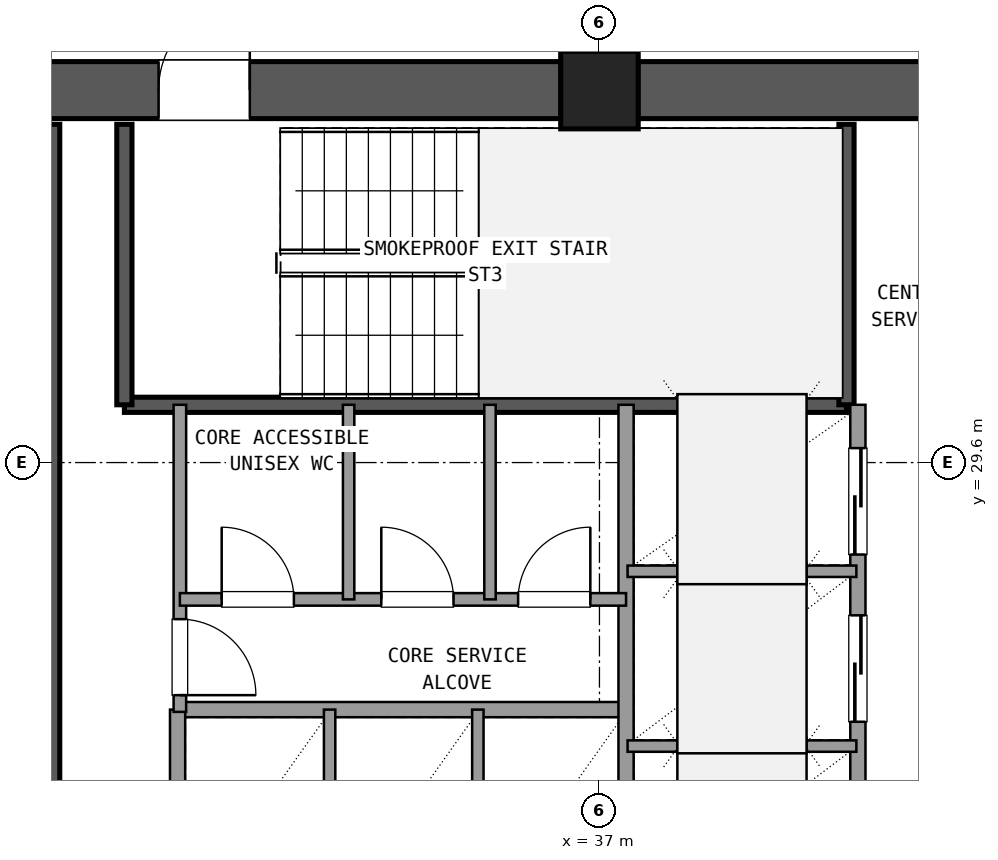
"""IFC4 building model, lengths in metres.
Left out: names, types, materials, properties, quantities, classifications, styles, units other than length and angle.
Written with IfcOpenShell. Run it as: python <this file> out.ifc"""

import sys

from ifc_helpers import new_model, si_unit, direction, frame, frame_2d, origin, origin_2d, place, context, subcontext, project, spatial, rectangle, extrude, element, fill, save


model = new_model("IFC4")
c1 = context("Model", 3, precision=1e-05, world=origin(), true_north=direction((0.0, 1.0)))
c2 = subcontext(c1, "Body", "Model", "MODEL_VIEW")
j1 = project(units=[si_unit("LENGTHUNIT", "METRE"), si_unit("PLANEANGLEUNIT", "RADIAN")], contexts=[c1])
p1 = place(None, origin())
s1 = spatial("IfcSite", under=j1, at=p1, CompositionType="ELEMENT")
p2 = place(p1, origin())
s2 = spatial("IfcBuilding", under=s1, at=p2, CompositionType="ELEMENT")
p3 = place(p2, frame((0.0, 0.0, 117.18)))
s3 = spatial("IfcBuildingStorey", under=s2, at=p3, CompositionType="ELEMENT", Elevation=117.18)
p4 = place(p3, frame((37.0, 34.5, 0.0), z_axis=(0.0, 0.0, 1.0), x_axis=(1.0, 0.0, 0.0)))
e1 = element("IfcColumn", 1, at=p4, inside=s3, PredefinedType="COLUMN", context=c2, shape_type="SweptSolid", body=[
    extrude(rectangle(XDim=1.02, YDim=1.02, at=origin_2d()), origin(), (0.0, 0.0, 1.0), 3.6),
])
p5 = place(p3, frame((47.695, 34.5, 0.0), z_axis=(0.0, 0.0, 1.0), x_axis=(-1.0, 0.0, 0.0)))
e2 = element("IfcWall", 2, at=p5, inside=s3, PredefinedType="SHEAR", context=c2, shape_type="SweptSolid", body=[
    extrude(rectangle(XDim=10.19, YDim=0.75, at=frame_2d((5.095, 0.0))), origin(), (0.0, 0.0, 1.0), 3.32),
])
p6 = place(p5, frame((4.595, 0.0, 0.0)))
e3 = element("IfcOpeningElement", 3, at=p6, cuts=e2, PredefinedType="OPENING", context=c2, shape_type="SweptSolid", body=[
    extrude(rectangle(XDim=1.6, YDim=2.2, at=frame_2d((0.8, 1.1))), frame((0.0, 0.385, 0.0), z_axis=(0.0, -1.0, 0.0), x_axis=(1.0, 0.0, 0.0)), (0.0, 0.0, 1.0), 0.77),
])
p7 = place(p3, frame((36.495, 34.5, 0.0), z_axis=(0.0, 0.0, 1.0), x_axis=(-1.0, 0.0, 0.0)))
e4 = element("IfcWall", 4, at=p7, inside=s3, PredefinedType="SHEAR", context=c2, shape_type="SweptSolid", body=[
    extrude(rectangle(XDim=10.19, YDim=0.75, at=frame_2d((5.095, 0.0))), origin(), (0.0, 0.0, 1.0), 3.32),
])
p8 = place(p7, frame((4.095, 0.0, 0.0)))
e5 = element("IfcOpeningElement", 5, at=p8, cuts=e4, PredefinedType="OPENING", context=c2, shape_type="SweptSolid", body=[
    extrude(rectangle(XDim=1.2, YDim=2.15, at=frame_2d((0.6, 1.075))), frame((0.0, 0.385, 0.0), z_axis=(0.0, -1.0, 0.0), x_axis=(1.0, 0.0, 0.0)), (0.0, 0.0, 1.0), 0.77),
])
p9 = place(p3, frame((29.8, 24.65, 0.0), z_axis=(0.0, 0.0, 1.0), x_axis=(0.0, 1.0, 0.0)))
e6 = element("IfcWall", 6, at=p9, inside=s3, PredefinedType="SHEAR", context=c2, shape_type="SweptSolid", body=[
    extrude(rectangle(XDim=9.4, YDim=0.2, at=frame_2d((4.7, 0.0))), origin(), (0.0, 0.0, 1.0), 3.32),
])
p10 = place(p3, frame((30.75, 30.36, 0.0), z_axis=(0.0, 0.0, 1.0), x_axis=(1.0, 0.0, 0.0)))
e7 = element("IfcWall", 7, at=p10, inside=s3, PredefinedType="SHEAR", context=c2, shape_type="SweptSolid", body=[
    extrude(rectangle(XDim=9.5, YDim=0.2, at=frame_2d((4.75, 0.0))), origin(), (0.0, 0.0, 1.0), 3.32),
])
for number, where, z_axis, x_axis in (
    (8, (30.75, 30.36, 0.0), (0.0, 0.0, 1.0), (0.0, 1.0, 0.0)),
    (9, (40.25, 30.36, 0.0), (0.0, 0.0, 1.0), (0.0, 1.0, 0.0)),
):
    element("IfcWall", number, at=place(p3, frame(where, z_axis=z_axis, x_axis=x_axis)), inside=s3, PredefinedType="SHEAR", context=c2, shape_type="SweptSolid", body=[
        extrude(rectangle(XDim=3.69, YDim=0.2, at=frame_2d((1.845, 0.0))), origin(), (0.0, 0.0, 1.0), 3.32),
    ])
p11 = place(p3, frame((31.45, 26.35, 0.0), z_axis=(0.0, 0.0, 1.0), x_axis=(1.0, 0.0, 0.0)))
e10 = element("IfcWall", 10, at=p11, inside=s3, PredefinedType="SOLIDWALL", context=c2, shape_type="SweptSolid", body=[
    extrude(rectangle(XDim=5.9, YDim=0.2, at=frame_2d((2.95, 0.0))), origin(), (0.0, 0.0, 1.0), 2.61),
])
p12 = place(p3, frame((31.45, 23.54, 0.0), z_axis=(0.0, 0.0, 1.0), x_axis=(0.0, 1.0, 0.0)))
e11 = element("IfcWall", 11, at=p12, inside=s3, PredefinedType="SOLIDWALL", context=c2, shape_type="SweptSolid", body=[
    extrude(rectangle(XDim=2.81, YDim=0.2, at=frame_2d((1.405, 0.0))), origin(), (0.0, 0.0, 1.0), 2.61),
])
for number, where, z_axis, x_axis in (
    (12, (33.45, 23.54, 0.0), (0.0, 0.0, 1.0), (0.0, 1.0, 0.0)),
    (13, (35.4, 23.54, 0.0), (0.0, 0.0, 1.0), (0.0, 1.0, 0.0)),
):
    element("IfcWall", number, at=place(p3, frame(where, z_axis=z_axis, x_axis=x_axis)), inside=s3, PredefinedType="PARTITIONING", context=c2, shape_type="SweptSolid", body=[
        extrude(rectangle(XDim=2.81, YDim=0.15, at=frame_2d((1.405, 0.0))), origin(), (0.0, 0.0, 1.0), 2.61),
    ])
p13 = place(p3, frame((37.35, 23.54, 0.0), z_axis=(0.0, 0.0, 1.0), x_axis=(0.0, 1.0, 0.0)))
e14 = element("IfcWall", 14, at=p13, inside=s3, PredefinedType="SOLIDWALL", context=c2, shape_type="SweptSolid", body=[
    extrude(rectangle(XDim=6.82, YDim=0.2, at=frame_2d((3.41, 0.0))), origin(), (0.0, 0.0, 1.0), 2.61),
])
p14 = place(p3, frame((40.4, 23.54, 0.0), z_axis=(0.0, 0.0, 1.0), x_axis=(0.0, 1.0, 0.0)))
e15 = element("IfcWall", 15, at=p14, inside=s3, PredefinedType="SOLIDWALL", context=c2, shape_type="SweptSolid", body=[
    extrude(rectangle(XDim=6.82, YDim=0.2, at=frame_2d((3.41, 0.0))), origin(), (0.0, 0.0, 1.0), 2.61),
])
p15 = place(p14, frame((0.35, 0.0, 0.0)))
e16 = element("IfcOpeningElement", 16, at=p15, cuts=e15, PredefinedType="OPENING", context=c2, shape_type="SweptSolid", body=[
    extrude(rectangle(XDim=1.4, YDim=2.2, at=frame_2d((0.7, 1.1))), frame((0.0, 0.11, 0.0), z_axis=(0.0, -1.0, 0.0), x_axis=(1.0, 0.0, 0.0)), (0.0, 0.0, 1.0), 0.22),
])
p16 = place(p14, frame((2.65, 0.0, 0.0)))
e17 = element("IfcOpeningElement", 17, at=p16, cuts=e15, PredefinedType="OPENING", context=c2, shape_type="SweptSolid", body=[
    extrude(rectangle(XDim=1.4, YDim=2.2, at=frame_2d((0.7, 1.1))), frame((0.0, 0.11, 0.0), z_axis=(0.0, -1.0, 0.0), x_axis=(1.0, 0.0, 0.0)), (0.0, 0.0, 1.0), 0.22),
])
p17 = place(p14, frame((4.85, 0.0, 0.0)))
e18 = element("IfcOpeningElement", 18, at=p17, cuts=e15, PredefinedType="OPENING", context=c2, shape_type="SweptSolid", body=[
    extrude(rectangle(XDim=1.4, YDim=2.2, at=frame_2d((0.7, 1.1))), frame((0.0, 0.11, 0.0), z_axis=(0.0, -1.0, 0.0), x_axis=(1.0, 0.0, 0.0)), (0.0, 0.0, 1.0), 0.22),
])
for number, where, z_axis, x_axis in (
    (19, (37.37, 25.87, 0.0), (0.0, 0.0, 1.0), (1.0, 0.0, 0.0)),
    (20, (37.37, 28.17, 0.0), (0.0, 0.0, 1.0), (1.0, 0.0, 0.0)),
):
    element("IfcWall", number, at=place(p3, frame(where, z_axis=z_axis, x_axis=x_axis)), inside=s3, PredefinedType="PARTITIONING", context=c2, shape_type="SweptSolid", body=[
        extrude(rectangle(XDim=3.01, YDim=0.15, at=frame_2d((1.505, 0.0))), origin(), (0.0, 0.0, 1.0), 2.61),
    ])
p18 = place(p3, frame((31.48, 26.32, 0.0), z_axis=(0.0, 0.0, 1.0), x_axis=(0.0, 1.0, 0.0)))
e21 = element("IfcWall", 21, at=p18, inside=s3, PredefinedType="PLUMBINGWALL", context=c2, shape_type="SweptSolid", body=[
    extrude(rectangle(XDim=4.04, YDim=0.165, at=frame_2d((2.02, 0.0))), origin(), (0.0, 0.0, 1.0), 2.61),
])
p19 = place(p18, frame((0.22, 0.0, 0.0)))
e22 = element("IfcOpeningElement", 22, at=p19, cuts=e21, PredefinedType="OPENING", context=c2, shape_type="SweptSolid", body=[
    extrude(rectangle(XDim=1.0, YDim=2.15, at=frame_2d((0.5, 1.075))), frame((0.0, 0.093, 0.0), z_axis=(0.0, -1.0, 0.0), x_axis=(1.0, 0.0, 0.0)), (0.0, 0.0, 1.0), 0.185),
])
p20 = place(p3, frame((31.48, 27.8, 0.0), z_axis=(0.0, 0.0, 1.0), x_axis=(1.0, 0.0, 0.0)))
e23 = element("IfcWall", 23, at=p20, inside=s3, PredefinedType="PLUMBINGWALL", context=c2, shape_type="SweptSolid", body=[
    extrude(rectangle(XDim=5.87, YDim=0.165, at=frame_2d((2.935, 0.0))), origin(), (0.0, 0.0, 1.0), 2.61),
])
p21 = place(p20, frame((0.55, 0.0, 0.0)))
e24 = element("IfcOpeningElement", 24, at=p21, cuts=e23, PredefinedType="OPENING", context=c2, shape_type="SweptSolid", body=[
    extrude(rectangle(XDim=0.95, YDim=2.1, at=frame_2d((0.475, 1.05))), frame((0.0, 0.093, 0.0), z_axis=(0.0, -1.0, 0.0), x_axis=(1.0, 0.0, 0.0)), (0.0, 0.0, 1.0), 0.185),
])
p22 = place(p20, frame((2.65, 0.0, 0.0)))
e25 = element("IfcOpeningElement", 25, at=p22, cuts=e23, PredefinedType="OPENING", context=c2, shape_type="SweptSolid", body=[
    extrude(rectangle(XDim=0.95, YDim=2.1, at=frame_2d((0.475, 1.05))), frame((0.0, 0.093, 0.0), z_axis=(0.0, -1.0, 0.0), x_axis=(1.0, 0.0, 0.0)), (0.0, 0.0, 1.0), 0.185),
])
p23 = place(p20, frame((4.45, 0.0, 0.0)))
e26 = element("IfcOpeningElement", 26, at=p23, cuts=e23, PredefinedType="OPENING", context=c2, shape_type="SweptSolid", body=[
    extrude(rectangle(XDim=0.95, YDim=2.1, at=frame_2d((0.475, 1.05))), frame((0.0, 0.093, 0.0), z_axis=(0.0, -1.0, 0.0), x_axis=(1.0, 0.0, 0.0)), (0.0, 0.0, 1.0), 0.185),
])
for number, where, z_axis, x_axis in (
    (27, (33.7, 27.8, 0.0), (0.0, 0.0, 1.0), (0.0, 1.0, 0.0)),
    (28, (35.56, 27.8, 0.0), (0.0, 0.0, 1.0), (0.0, 1.0, 0.0)),
):
    element("IfcWall", number, at=place(p3, frame(where, z_axis=z_axis, x_axis=x_axis)), inside=s3, PredefinedType="PARTITIONING", context=c2, shape_type="SweptSolid", body=[
        extrude(rectangle(XDim=2.56, YDim=0.15, at=frame_2d((1.28, 0.0))), origin(), (0.0, 0.0, 1.0), 2.61),
    ])
p24 = place(p3, frame((37.0, 34.95, 0.0), z_axis=(0.0, 0.0, 1.0), x_axis=(0.0, 1.0, 0.0)))
e29 = element("IfcWall", 29, at=p24, inside=s3, PredefinedType="PARTITIONING", context=c2, shape_type="SweptSolid", body=[
    extrude(rectangle(XDim=3.21, YDim=0.18, at=frame_2d((1.605, 0.0))), origin(), (0.0, 0.0, 1.0), 2.61),
])
p25 = place(p24, frame((0.605, 0.0, 0.0)))
e30 = element("IfcOpeningElement", 30, at=p25, cuts=e29, PredefinedType="OPENING", context=c2, shape_type="SweptSolid", body=[
    extrude(rectangle(XDim=2.0, YDim=2.2, at=frame_2d((1.0, 1.1))), frame((0.0, 0.1, 0.0), z_axis=(0.0, -1.0, 0.0), x_axis=(1.0, 0.0, 0.0)), (0.0, 0.0, 1.0), 0.2),
])
p26 = place(p8, frame((1.2, 0.0, 0.0), z_axis=(0.0, 0.0, 1.0), x_axis=(-1.0, 0.0, 0.0)))
e31 = element("IfcDoor", 31, at=p26, inside=s3, OperationType="SINGLE_SWING_LEFT", PredefinedType="DOOR", context=c2, shape_type="SweptSolid", body=[
    extrude(rectangle(XDim=1.2, YDim=2.15, at=frame_2d((0.6, 1.075))), frame((0.0, 0.025, 0.0), z_axis=(0.0, -1.0, 0.0), x_axis=(1.0, 0.0, 0.0)), (0.0, 0.0, 1.0), 0.05),
])
fill(e5, e31)
p27 = place(p16, origin())
e32 = element("IfcDoor", 32, at=p27, inside=s3, OperationType="SLIDING_TO_LEFT", PredefinedType="DOOR", context=c2, shape_type="SweptSolid", body=[
    extrude(rectangle(XDim=1.4, YDim=2.2, at=frame_2d((0.7, 1.1))), frame((0.0, 0.025, 0.0), z_axis=(0.0, -1.0, 0.0), x_axis=(1.0, 0.0, 0.0)), (0.0, 0.0, 1.0), 0.05),
])
fill(e17, e32)
p28 = place(p17, origin())
e33 = element("IfcDoor", 33, at=p28, inside=s3, OperationType="SLIDING_TO_RIGHT", PredefinedType="DOOR", context=c2, shape_type="SweptSolid", body=[
    extrude(rectangle(XDim=1.4, YDim=2.2, at=frame_2d((0.7, 1.1))), frame((0.0, 0.025, 0.0), z_axis=(0.0, -1.0, 0.0), x_axis=(1.0, 0.0, 0.0)), (0.0, 0.0, 1.0), 0.05),
])
fill(e18, e33)
p29 = place(p19, frame((1.0, 0.0, 0.0), z_axis=(0.0, 0.0, 1.0), x_axis=(-1.0, 0.0, 0.0)))
e34 = element("IfcDoor", 34, at=p29, inside=s3, OperationType="SINGLE_SWING_LEFT", PredefinedType="DOOR", context=c2, shape_type="SweptSolid", body=[
    extrude(rectangle(XDim=1.0, YDim=2.15, at=frame_2d((0.5, 1.075))), frame((0.0, 0.025, 0.0), z_axis=(0.0, -1.0, 0.0), x_axis=(1.0, 0.0, 0.0)), (0.0, 0.0, 1.0), 0.05),
])
fill(e22, e34)
p30 = place(p21, origin())
e35 = element("IfcDoor", 35, at=p30, inside=s3, OperationType="SINGLE_SWING_LEFT", PredefinedType="DOOR", context=c2, shape_type="SweptSolid", body=[
    extrude(rectangle(XDim=0.95, YDim=2.1, at=frame_2d((0.475, 1.05))), frame((0.0, 0.025, 0.0), z_axis=(0.0, -1.0, 0.0), x_axis=(1.0, 0.0, 0.0)), (0.0, 0.0, 1.0), 0.05),
])
fill(e24, e35)
p31 = place(p22, origin())
e36 = element("IfcDoor", 36, at=p31, inside=s3, OperationType="SINGLE_SWING_LEFT", PredefinedType="DOOR", context=c2, shape_type="SweptSolid", body=[
    extrude(rectangle(XDim=0.95, YDim=2.1, at=frame_2d((0.475, 1.05))), frame((0.0, 0.025, 0.0), z_axis=(0.0, -1.0, 0.0), x_axis=(1.0, 0.0, 0.0)), (0.0, 0.0, 1.0), 0.05),
])
fill(e25, e36)
p32 = place(p23, origin())
e37 = element("IfcDoor", 37, at=p32, inside=s3, OperationType="SINGLE_SWING_RIGHT", PredefinedType="DOOR", context=c2, shape_type="SweptSolid", body=[
    extrude(rectangle(XDim=0.95, YDim=2.1, at=frame_2d((0.475, 1.05))), frame((0.0, 0.025, 0.0), z_axis=(0.0, -1.0, 0.0), x_axis=(1.0, 0.0, 0.0)), (0.0, 0.0, 1.0), 0.05),
])
fill(e26, e37)
save(model, sys.argv[1])
